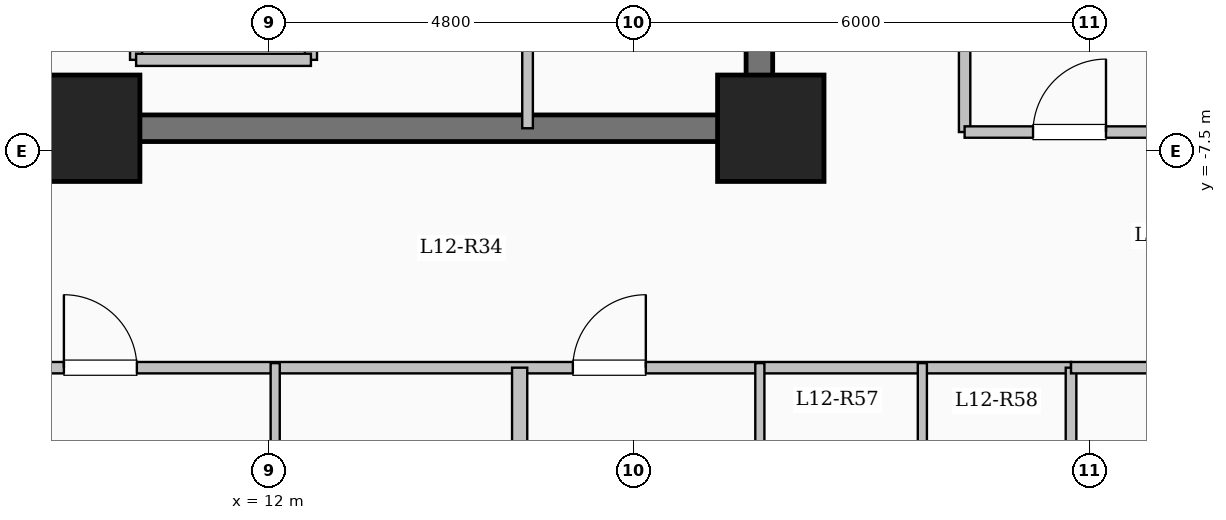
"""IFC4 building model, lengths in metres.
Left out: names, types, materials, properties, quantities, classifications, styles, units other than length and angle.
Written with IfcOpenShell. Run it as: python <this file> out.ifc"""

import sys

from ifc_helpers import new_model, si_unit, direction, frame, frame_2d, origin, origin_2d, place, context, subcontext, project, spatial, rectangle, extrude, element, fill, save


model = new_model("IFC4")
c1 = context("Model", 3, precision=1e-05, world=origin(), true_north=direction((0.0, 1.0)))
c2 = subcontext(c1, "Body", "Model", "MODEL_VIEW")
j1 = project(units=[si_unit("LENGTHUNIT", "METRE"), si_unit("PLANEANGLEUNIT", "RADIAN")], contexts=[c1])
p1 = place(None, origin())
s1 = spatial("IfcSite", under=j1, at=p1, CompositionType="ELEMENT")
p2 = place(p1, origin())
s2 = spatial("IfcBuilding", under=s1, at=p2, CompositionType="ELEMENT")
p3 = place(p2, frame((0.0, 0.0, 47.45)))
s3 = spatial("IfcBuildingStorey", under=s2, at=p3, CompositionType="ELEMENT", Elevation=47.45)
for number, where, z_axis, x_axis in (
    (1, (9.6, -7.2, 0.0), (0.0, 0.0, 1.0), (1.0, 0.0, 0.0)),
    (2, (18.6, -7.2, 0.0), (0.0, 0.0, 1.0), (1.0, 0.0, 0.0)),
):
    element("IfcColumn", number, at=place(p3, frame(where, z_axis=z_axis, x_axis=x_axis)), inside=s3, PredefinedType="COLUMN", context=c2, shape_type="SweptSolid", body=[
        extrude(rectangle(XDim=1.4, YDim=1.4, at=origin_2d()), origin(), (0.0, 0.0, 1.0), 3.35),
    ])
for number, where, z_axis, x_axis in (
    (3, (10.25, -6.3, 0.0), (0.0, 0.0, 1.0), (0.0, 1.0, 0.0)),
    (4, (12.55, -6.3, 0.0), (0.0, 0.0, 1.0), (0.0, 1.0, 0.0)),
):
    element("IfcWall", number, at=place(p3, frame(where, z_axis=z_axis, x_axis=x_axis)), inside=s3, PredefinedType="SOLIDWALL", context=c2, shape_type="SweptSolid", body=[
        extrude(rectangle(XDim=2.6, YDim=0.16, at=frame_2d((1.3, 0.0))), origin(), (0.0, 0.0, 1.0), 3.1),
    ])
p4 = place(p3, frame((10.25, -6.3, 0.0), z_axis=(0.0, 0.0, 1.0), x_axis=(1.0, 0.0, 0.0)))
e5 = element("IfcWall", 5, at=p4, inside=s3, PredefinedType="SOLIDWALL", context=c2, shape_type="SweptSolid", body=[
    extrude(rectangle(XDim=2.3, YDim=0.16, at=frame_2d((1.15, 0.0))), origin(), (0.0, 0.0, 1.0), 3.1),
])
p5 = place(p3, frame((18.45, -7.375, 0.0), z_axis=(0.0, 0.0, 1.0), x_axis=(0.0, 1.0, 0.0)))
e6 = element("IfcWall", 6, at=p5, inside=s3, PredefinedType="SHEAR", context=c2, shape_type="SweptSolid", body=[
    extrude(rectangle(XDim=14.05, YDim=0.35, at=frame_2d((7.025, 0.0))), origin(), (0.0, 0.0, 1.0), 3.35),
])
p6 = place(p3, frame((10.075, -7.2, 0.0), z_axis=(0.0, 0.0, 1.0), x_axis=(1.0, 0.0, 0.0)))
e7 = element("IfcWall", 7, at=p6, inside=s3, PredefinedType="SHEAR", context=c2, shape_type="SweptSolid", body=[
    extrude(rectangle(XDim=8.55, YDim=0.35, at=frame_2d((4.275, 0.0))), origin(), (0.0, 0.0, 1.0), 3.35),
])
p7 = place(p3, frame((15.4, -7.2, 0.0), z_axis=(0.0, 0.0, 1.0), x_axis=(0.0, 1.0, 0.0)))
e8 = element("IfcWall", 8, at=p7, inside=s3, PredefinedType="PARTITIONING", context=c2, shape_type="SweptSolid", body=[
    extrude(rectangle(XDim=10.45, YDim=0.14, at=frame_2d((5.225, 0.0))), origin(), (0.0, 0.0, 1.0), 3.1),
])
p8 = place(p7, frame((9.25, 0.0, 0.0)))
e9 = element("IfcOpeningElement", 9, at=p8, cuts=e8, PredefinedType="OPENING", context=c2, shape_type="SweptSolid", body=[
    extrude(rectangle(XDim=0.9, YDim=2.08, at=frame_2d((0.45, 1.04))), frame((0.0, 0.08, 0.0), z_axis=(0.0, -1.0, 0.0), x_axis=(1.0, 0.0, 0.0)), (0.0, 0.0, 1.0), 0.16),
])
p9 = place(p3, frame((21.15, -7.25, 0.0), z_axis=(0.0, 0.0, 1.0), x_axis=(0.0, 1.0, 0.0)))
e10 = element("IfcWall", 10, at=p9, inside=s3, PredefinedType="PARTITIONING", context=c2, shape_type="SweptSolid", body=[
    extrude(rectangle(XDim=18.0, YDim=0.15, at=frame_2d((9.0, 0.0))), origin(), (0.0, 0.0, 1.0), 2.585),
])
p10 = place(p3, frame((8.55, -10.35, 0.0), z_axis=(0.0, 0.0, 1.0), x_axis=(1.0, 0.0, 0.0)))
e11 = element("IfcWall", 11, at=p10, inside=s3, PredefinedType="PARTITIONING", context=c2, shape_type="SweptSolid", body=[
    extrude(rectangle(XDim=14.0, YDim=0.15, at=frame_2d((7.0, 0.0))), origin(), (0.0, 0.0, 1.0), 3.1),
])
p11 = place(p10, frame((0.75, 0.0, 0.0)))
e12 = element("IfcOpeningElement", 12, at=p11, cuts=e11, PredefinedType="OPENING", context=c2, shape_type="SweptSolid", body=[
    extrude(rectangle(XDim=0.96, YDim=2.15, at=frame_2d((0.48, 1.075))), frame((0.0, 0.085, 0.0), z_axis=(0.0, -1.0, 0.0), x_axis=(1.0, 0.0, 0.0)), (0.0, 0.0, 1.0), 0.17),
])
p12 = place(p10, frame((7.446, 0.0, 0.0)))
e13 = element("IfcOpeningElement", 13, at=p12, cuts=e11, PredefinedType="OPENING", context=c2, shape_type="SweptSolid", body=[
    extrude(rectangle(XDim=0.96, YDim=2.15, at=frame_2d((0.48, 1.075))), frame((0.0, 0.085, 0.0), z_axis=(0.0, -1.0, 0.0), x_axis=(1.0, 0.0, 0.0)), (0.0, 0.0, 1.0), 0.17),
])
p13 = place(p3, frame((15.296, -23.6, 0.0), z_axis=(0.0, 0.0, 1.0), x_axis=(0.0, 1.0, 0.0)))
e14 = element("IfcWall", 14, at=p13, inside=s3, PredefinedType="SOLIDWALL", context=c2, shape_type="SweptSolid", body=[
    extrude(rectangle(XDim=13.25, YDim=0.2, at=frame_2d((6.625, 0.0))), origin(), (0.0, 0.0, 1.0), 2.435),
])
p14 = place(p3, frame((12.08, -13.51, 0.0), z_axis=(0.0, 0.0, 1.0), x_axis=(0.0, 1.0, 0.0)))
e15 = element("IfcWall", 15, at=p14, inside=s3, PredefinedType="PARTITIONING", context=c2, shape_type="SweptSolid", body=[
    extrude(rectangle(XDim=3.22, YDim=0.12, at=frame_2d((1.61, 0.0))), origin(), (0.0, 0.0, 1.0), 3.1),
])
p15 = place(p14, frame((1.14, 0.0, 0.0)))
e16 = element("IfcOpeningElement", 16, at=p15, cuts=e15, PredefinedType="OPENING", context=c2, shape_type="SweptSolid", body=[
    extrude(rectangle(XDim=0.88, YDim=2.1, at=frame_2d((0.44, 1.05))), frame((0.0, 0.07, 0.0), z_axis=(0.0, -1.0, 0.0), x_axis=(1.0, 0.0, 0.0)), (0.0, 0.0, 1.0), 0.14),
])
p16 = place(p3, frame((18.456, -23.6, 0.0), z_axis=(0.0, 0.0, 1.0), x_axis=(0.0, 1.0, 0.0)))
e17 = element("IfcWall", 17, at=p16, inside=s3, PredefinedType="PARTITIONING", context=c2, shape_type="SweptSolid", body=[
    extrude(rectangle(XDim=13.31, YDim=0.12, at=frame_2d((6.655, 0.0))), origin(), (0.0, 0.0, 1.0), 3.1),
])
p17 = place(p16, frame((9.485, 0.0, 0.0)))
e18 = element("IfcOpeningElement", 18, at=p17, cuts=e17, PredefinedType="OPENING", context=c2, shape_type="SweptSolid", body=[
    extrude(rectangle(XDim=1.08, YDim=2.15, at=frame_2d((0.54, 1.075))), frame((0.0, 0.07, 0.0), z_axis=(0.0, -1.0, 0.0), x_axis=(1.0, 0.0, 0.0)), (0.0, 0.0, 1.0), 0.14),
])
p18 = place(p3, frame((20.594, -12.75, 0.0), z_axis=(0.0, 0.0, 1.0), x_axis=(0.0, 1.0, 0.0)))
e19 = element("IfcWall", 19, at=p18, inside=s3, PredefinedType="PARTITIONING", context=c2, shape_type="SweptSolid", body=[
    extrude(rectangle(XDim=2.46, YDim=0.12, at=frame_2d((1.23, 0.0))), origin(), (0.0, 0.0, 1.0), 3.1),
])
p19 = place(p3, frame((21.15, -7.25, 0.0), z_axis=(0.0, 0.0, 1.0), x_axis=(1.0, 0.0, 0.0)))
e20 = element("IfcWall", 20, at=p19, inside=s3, PredefinedType="PARTITIONING", context=c2, shape_type="SweptSolid", body=[
    extrude(rectangle(XDim=7.53, YDim=0.15, at=frame_2d((3.765, 0.0))), origin(), (0.0, 0.0, 1.0), 3.1),
])
p20 = place(p19, frame((0.9, 0.0, 0.0)))
e21 = element("IfcOpeningElement", 21, at=p20, cuts=e20, PredefinedType="OPENING", context=c2, shape_type="SweptSolid", body=[
    extrude(rectangle(XDim=0.96, YDim=2.15, at=frame_2d((0.48, 1.075))), frame((0.0, 0.085, 0.0), z_axis=(0.0, -1.0, 0.0), x_axis=(1.0, 0.0, 0.0)), (0.0, 0.0, 1.0), 0.17),
])
p21 = place(p3, frame((22.55, -19.05, 0.0), z_axis=(0.0, 0.0, 1.0), x_axis=(0.0, 1.0, 0.0)))
e22 = element("IfcWall", 22, at=p21, inside=s3, PredefinedType="PARTITIONING", context=c2, shape_type="SweptSolid", body=[
    extrude(rectangle(XDim=8.7, YDim=0.14, at=frame_2d((4.35, 0.0))), origin(), (0.0, 0.0, 1.0), 3.1),
])
p22 = place(p3, frame((22.55, -10.35, 0.0), z_axis=(0.0, 0.0, 1.0), x_axis=(1.0, 0.0, 0.0)))
e23 = element("IfcWall", 23, at=p22, inside=s3, PredefinedType="PARTITIONING", context=c2, shape_type="SweptSolid", body=[
    extrude(rectangle(XDim=6.13, YDim=0.15, at=frame_2d((3.065, 0.0))), origin(), (0.0, 0.0, 1.0), 3.1),
])
p23 = place(p22, frame((2.59, 0.0, 0.0)))
e24 = element("IfcOpeningElement", 24, at=p23, cuts=e23, PredefinedType="OPENING", context=c2, shape_type="SweptSolid", body=[
    extrude(rectangle(XDim=0.95, YDim=2.15, at=frame_2d((0.475, 1.075))), frame((0.0, 0.085, 0.0), z_axis=(0.0, -1.0, 0.0), x_axis=(1.0, 0.0, 0.0)), (0.0, 0.0, 1.0), 0.17),
])
p24 = place(p11, origin())
e25 = element("IfcDoor", 25, at=p24, inside=s3, OperationType="SINGLE_SWING_LEFT", PredefinedType="DOOR", context=c2, shape_type="SweptSolid", body=[
    extrude(rectangle(XDim=0.96, YDim=2.15, at=frame_2d((0.48, 1.075))), frame((0.0, 0.025, 0.0), z_axis=(0.0, -1.0, 0.0), x_axis=(1.0, 0.0, 0.0)), (0.0, 0.0, 1.0), 0.05),
])
fill(e12, e25)
p25 = place(p12, origin())
e26 = element("IfcDoor", 26, at=p25, inside=s3, OperationType="SINGLE_SWING_RIGHT", PredefinedType="DOOR", context=c2, shape_type="SweptSolid", body=[
    extrude(rectangle(XDim=0.96, YDim=2.15, at=frame_2d((0.48, 1.075))), frame((0.0, 0.025, 0.0), z_axis=(0.0, -1.0, 0.0), x_axis=(1.0, 0.0, 0.0)), (0.0, 0.0, 1.0), 0.05),
])
fill(e13, e26)
p26 = place(p20, origin())
e27 = element("IfcDoor", 27, at=p26, inside=s3, OperationType="SINGLE_SWING_RIGHT", PredefinedType="DOOR", context=c2, shape_type="SweptSolid", body=[
    extrude(rectangle(XDim=0.96, YDim=2.15, at=frame_2d((0.48, 1.075))), frame((0.0, 0.025, 0.0), z_axis=(0.0, -1.0, 0.0), x_axis=(1.0, 0.0, 0.0)), (0.0, 0.0, 1.0), 0.05),
])
fill(e21, e27)
save(model, sys.argv[1])
